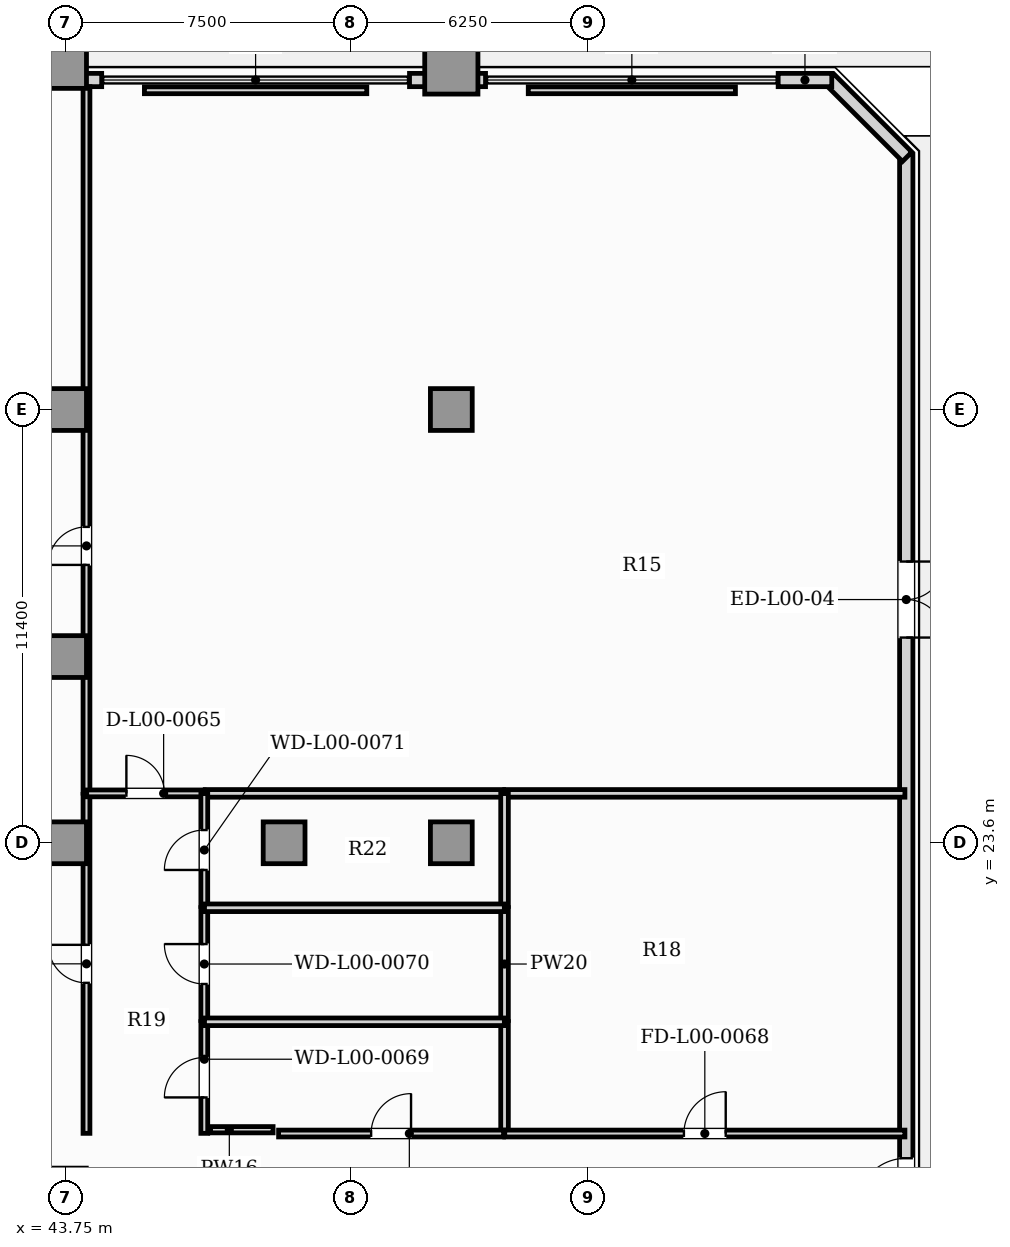
"""IFC4 building model, lengths in metres.
Left out: names, types, materials, properties, quantities, classifications, styles, units other than length and angle.
Written with IfcOpenShell. Run it as: python <this file> out.ifc"""

import sys

from ifc_helpers import new_model, si_unit, direction, frame, frame_2d, origin, origin_2d, place, context, subcontext, project, spatial, rectangle, hollow_rectangle, extrude, element, fill, save


model = new_model("IFC4")
c1 = context("Model", 3, precision=1e-05, world=origin(), true_north=direction((0.0, 1.0)))
c2 = subcontext(c1, "Body", "Model", "MODEL_VIEW")
j1 = project(units=[si_unit("LENGTHUNIT", "METRE"), si_unit("PLANEANGLEUNIT", "RADIAN")], contexts=[c1])
p1 = place(None, origin())
s1 = spatial("IfcSite", under=j1, at=p1, CompositionType="ELEMENT")
p2 = place(p1, origin())
s2 = spatial("IfcBuilding", under=s1, at=p2, CompositionType="ELEMENT")
p3 = place(p2, origin())
s3 = spatial("IfcBuildingStorey", under=s2, at=p3, CompositionType="ELEMENT", Elevation=0.0)
p4 = place(p3, frame((53.9, 44.0, 0.0), z_axis=(0.0, 0.0, 1.0), x_axis=(1.0, 0.0, 0.0)))
e1 = element("IfcColumn", 1, at=p4, inside=s3, PredefinedType="USERDEFINED", context=c2, shape_type="SweptSolid", body=[
    extrude(hollow_rectangle(XDim=1.4, YDim=1.4, WallThickness=0.08, at=origin_2d()), origin(), (0.0, 0.0, 1.0), 5.4),
])
for number, where, z_axis, x_axis in (
    (2, (43.75, 23.6, 0.0), (0.0, 0.0, 1.0), (1.0, 0.0, 0.0)),
    (3, (43.75, 35.0, 0.0), (0.0, 0.0, 1.0), (1.0, 0.0, 0.0)),
    (4, (43.75, 44.0, 0.0), (0.0, 0.0, 1.0), (1.0, 0.0, 0.0)),
    (5, (53.9, 23.6, 0.0), (0.0, 0.0, 1.0), (1.0, 0.0, 0.0)),
    (6, (53.9, 35.0, 0.0), (0.0, 0.0, 1.0), (1.0, 0.0, 0.0)),
    (7, (49.5, 23.6, 0.0), (0.0, 0.0, 1.0), (1.0, 0.0, 0.0)),
    (8, (43.75, 28.5, 0.0), (0.0, 0.0, 1.0), (1.0, 0.0, 0.0)),
):
    element("IfcColumn", number, at=place(p3, frame(where, z_axis=z_axis, x_axis=x_axis)), inside=s3, PredefinedType="COLUMN", context=c2, shape_type="SweptSolid", body=[
        extrude(rectangle(XDim=1.1, YDim=1.1, at=origin_2d()), origin(), (0.0, 0.0, 1.0), 5.4),
    ])
p5 = place(p3, frame((65.87, -0.66, 0.0), z_axis=(0.0, 0.0, 1.0), x_axis=(0.0, 1.0, 0.0)))
e9 = element("IfcWall", 9, at=p5, inside=s3, PredefinedType="SOLIDWALL", context=c2, shape_type="SweptSolid", body=[
    extrude(rectangle(XDim=42.37, YDim=0.35, at=frame_2d((21.185, 0.0))), origin(), (0.0, 0.0, 1.0), 4.2),
])
p6 = place(p5, frame((14.66, 0.0, 0.0)))
e10 = element("IfcOpeningElement", 10, at=p6, cuts=e9, PredefinedType="OPENING", context=c2, shape_type="SweptSolid", body=[
    extrude(rectangle(XDim=1.3, YDim=2.2, at=frame_2d((0.65, 1.1))), frame((0.0, 0.185, 0.0), z_axis=(0.0, -1.0, 0.0), x_axis=(1.0, 0.0, 0.0)), (0.0, 0.0, 1.0), 0.37),
])
p7 = place(p5, frame((29.66, 0.0, 0.0)))
e11 = element("IfcOpeningElement", 11, at=p7, cuts=e9, PredefinedType="OPENING", context=c2, shape_type="SweptSolid", body=[
    extrude(rectangle(XDim=2.0, YDim=2.4, at=frame_2d((1.0, 1.2))), frame((0.0, 0.185, 0.0), z_axis=(0.0, -1.0, 0.0), x_axis=(1.0, 0.0, 0.0)), (0.0, 0.0, 1.0), 0.37),
])
p8 = place(p3, frame((65.894, 41.651, 0.0), z_axis=(0.0, 0.0, 1.0), x_axis=(-0.707064536853, 0.707149022997, 0.0)))
e12 = element("IfcWall", 12, at=p8, inside=s3, PredefinedType="SOLIDWALL", context=c2, shape_type="SweptSolid", body=[
    extrude(rectangle(XDim=2.89, YDim=0.35, at=frame_2d((1.445, 0.0))), origin(), (0.0, 0.0, 1.0), 5.1),
])
p9 = place(p3, frame((42.8, 43.67, 0.0), z_axis=(0.0, 0.0, 1.0), x_axis=(1.0, 0.0, 0.0)))
e13 = element("IfcWall", 13, at=p9, inside=s3, PredefinedType="SOLIDWALL", context=c2, shape_type="SweptSolid", body=[
    extrude(rectangle(XDim=1.9, YDim=0.35, at=frame_2d((0.95, 0.0))), origin(), (0.0, 0.0, 1.0), 4.483),
])
p10 = place(p3, frame((52.8, 43.67, 0.0), z_axis=(0.0, 0.0, 1.0), x_axis=(1.0, 0.0, 0.0)))
e14 = element("IfcWall", 14, at=p10, inside=s3, PredefinedType="SOLIDWALL", context=c2, shape_type="SweptSolid", body=[
    extrude(rectangle(XDim=2.0, YDim=0.35, at=frame_2d((1.0, 0.0))), origin(), (0.0, 0.0, 1.0), 4.483),
])
p11 = place(p3, frame((62.5, 43.67, 0.0), z_axis=(0.0, 0.0, 1.0), x_axis=(1.0, 0.0, 0.0)))
e15 = element("IfcWall", 15, at=p11, inside=s3, PredefinedType="SOLIDWALL", context=c2, shape_type="SweptSolid", body=[
    extrude(rectangle(XDim=1.41, YDim=0.35, at=frame_2d((0.705, 0.0))), origin(), (0.0, 0.0, 1.0), 4.2),
])
p12 = place(p3, frame((44.3, 24.905, 0.0), z_axis=(0.0, 0.0, 1.0), x_axis=(0.0, 1.0, 0.0)))
e16 = element("IfcWall", 16, at=p12, inside=s3, PredefinedType="PARTITIONING", context=c2, shape_type="SweptSolid", body=[
    extrude(rectangle(XDim=18.59, YDim=0.18, at=frame_2d((9.295, 0.0))), origin(), (0.0, 0.0, 1.0), 5.1),
])
p13 = place(p12, frame((6.007, 0.0, 0.0)))
e17 = element("IfcOpeningElement", 17, at=p13, cuts=e16, PredefinedType="OPENING", context=c2, shape_type="SweptSolid", body=[
    extrude(rectangle(XDim=1.0, YDim=2.15, at=frame_2d((0.5, 1.075))), frame((0.0, 0.1, 0.0), z_axis=(0.0, -1.0, 0.0), x_axis=(1.0, 0.0, 0.0)), (0.0, 0.0, 1.0), 0.2),
])
p14 = place(p3, frame((44.3, 15.955, 0.0), z_axis=(0.0, 0.0, 1.0), x_axis=(0.0, 1.0, 0.0)))
e18 = element("IfcWall", 18, at=p14, inside=s3, PredefinedType="PARTITIONING", context=c2, shape_type="SweptSolid", body=[
    extrude(rectangle(XDim=8.92, YDim=0.18, at=frame_2d((4.46, 0.0))), origin(), (0.0, 0.0, 1.0), 5.1),
])
p15 = place(p14, frame((3.96, 0.0, 0.0)))
e19 = element("IfcOpeningElement", 19, at=p15, cuts=e18, PredefinedType="OPENING", context=c2, shape_type="SweptSolid", body=[
    extrude(rectangle(XDim=1.0, YDim=2.15, at=frame_2d((0.5, 1.075))), frame((0.0, 0.1, 0.0), z_axis=(0.0, -1.0, 0.0), x_axis=(1.0, 0.0, 0.0)), (0.0, 0.0, 1.0), 0.2),
])
p16 = place(p3, frame((55.305, 24.9, 0.0), z_axis=(0.0, 0.0, 1.0), x_axis=(1.0, 0.0, 0.0)))
e20 = element("IfcWall", 20, at=p16, inside=s3, PredefinedType="PARTITIONING", context=c2, shape_type="SweptSolid", body=[
    extrude(rectangle(XDim=10.53, YDim=0.2, at=frame_2d((5.265, 0.0))), origin(), (0.0, 0.0, 1.0), 5.1),
])
p17 = place(p3, frame((44.305, 24.9, 0.0), z_axis=(0.0, 0.0, 1.0), x_axis=(1.0, 0.0, 0.0)))
e21 = element("IfcWall", 21, at=p17, inside=s3, PredefinedType="PARTITIONING", context=c2, shape_type="SweptSolid", body=[
    extrude(rectangle(XDim=3.09, YDim=0.18, at=frame_2d((1.545, 0.0))), origin(), (0.0, 0.0, 1.0), 5.1),
])
p18 = place(p17, frame((1.045, 0.0, 0.0)))
e22 = element("IfcOpeningElement", 22, at=p18, cuts=e21, PredefinedType="OPENING", context=c2, shape_type="SweptSolid", body=[
    extrude(rectangle(XDim=1.0, YDim=2.15, at=frame_2d((0.5, 1.075))), frame((0.0, 0.1, 0.0), z_axis=(0.0, -1.0, 0.0), x_axis=(1.0, 0.0, 0.0)), (0.0, 0.0, 1.0), 0.2),
])
p19 = place(p3, frame((47.425, 24.9, 0.0), z_axis=(0.0, 0.0, 1.0), x_axis=(1.0, 0.0, 0.0)))
e23 = element("IfcWall", 23, at=p19, inside=s3, PredefinedType="PARTITIONING", context=c2, shape_type="SweptSolid", body=[
    extrude(rectangle(XDim=7.85, YDim=0.2, at=frame_2d((3.925, 0.0))), origin(), (0.0, 0.0, 1.0), 5.1),
])
p20 = place(p3, frame((55.3, 15.955, 0.0), z_axis=(0.0, 0.0, 1.0), x_axis=(0.0, 1.0, 0.0)))
e24 = element("IfcWall", 24, at=p20, inside=s3, PredefinedType="PARTITIONING", context=c2, shape_type="SweptSolid", body=[
    extrude(rectangle(XDim=2.94, YDim=0.2, at=frame_2d((1.47, 0.0))), origin(), (0.0, 0.0, 1.0), 5.1),
])
for number, where, z_axis, x_axis in (
    (25, (55.3, 18.925, 0.0), (0.0, 0.0, 1.0), (0.0, 1.0, 0.0)),
    (26, (55.3, 21.925, 0.0), (0.0, 0.0, 1.0), (0.0, 1.0, 0.0)),
):
    element("IfcWall", number, at=place(p3, frame(where, z_axis=z_axis, x_axis=x_axis)), inside=s3, PredefinedType="PARTITIONING", context=c2, shape_type="SweptSolid", body=[
        extrude(rectangle(XDim=2.97, YDim=0.2, at=frame_2d((1.485, 0.0))), origin(), (0.0, 0.0, 1.0), 5.1),
    ])
p21 = place(p3, frame((55.305, 15.95, 0.0), z_axis=(0.0, 0.0, 1.0), x_axis=(1.0, 0.0, 0.0)))
e27 = element("IfcWall", 27, at=p21, inside=s3, PredefinedType="PARTITIONING", context=c2, shape_type="SweptSolid", body=[
    extrude(rectangle(XDim=10.53, YDim=0.18, at=frame_2d((5.265, 0.0))), origin(), (0.0, 0.0, 1.0), 5.1),
])
p22 = place(p21, frame((4.715, 0.0, 0.0)))
e28 = element("IfcOpeningElement", 28, at=p22, cuts=e27, PredefinedType="OPENING", context=c2, shape_type="SweptSolid", body=[
    extrude(rectangle(XDim=1.1, YDim=2.2, at=frame_2d((0.55, 1.1))), frame((0.0, 0.1, 0.0), z_axis=(0.0, -1.0, 0.0), x_axis=(1.0, 0.0, 0.0)), (0.0, 0.0, 1.0), 0.2),
])
p23 = place(p3, frame((47.4, 15.955, 0.0), z_axis=(0.0, 0.0, 1.0), x_axis=(0.0, 1.0, 0.0)))
e29 = element("IfcWall", 29, at=p23, inside=s3, PredefinedType="PARTITIONING", context=c2, shape_type="SweptSolid", body=[
    extrude(rectangle(XDim=2.94, YDim=0.18, at=frame_2d((1.47, 0.0))), origin(), (0.0, 0.0, 1.0), 5.1),
])
p24 = place(p23, frame((0.945, 0.0, 0.0)))
e30 = element("IfcOpeningElement", 30, at=p24, cuts=e29, PredefinedType="OPENING", context=c2, shape_type="SweptSolid", body=[
    extrude(rectangle(XDim=1.05, YDim=2.15, at=frame_2d((0.525, 1.075))), frame((0.0, 0.1, 0.0), z_axis=(0.0, -1.0, 0.0), x_axis=(1.0, 0.0, 0.0)), (0.0, 0.0, 1.0), 0.2),
])
p25 = place(p3, frame((47.4, 18.925, 0.0), z_axis=(0.0, 0.0, 1.0), x_axis=(0.0, 1.0, 0.0)))
e31 = element("IfcWall", 31, at=p25, inside=s3, PredefinedType="PARTITIONING", context=c2, shape_type="SweptSolid", body=[
    extrude(rectangle(XDim=2.97, YDim=0.18, at=frame_2d((1.485, 0.0))), origin(), (0.0, 0.0, 1.0), 5.1),
])
p26 = place(p25, frame((0.96, 0.0, 0.0)))
e32 = element("IfcOpeningElement", 32, at=p26, cuts=e31, PredefinedType="OPENING", context=c2, shape_type="SweptSolid", body=[
    extrude(rectangle(XDim=1.05, YDim=2.15, at=frame_2d((0.525, 1.075))), frame((0.0, 0.1, 0.0), z_axis=(0.0, -1.0, 0.0), x_axis=(1.0, 0.0, 0.0)), (0.0, 0.0, 1.0), 0.2),
])
p27 = place(p3, frame((47.4, 21.925, 0.0), z_axis=(0.0, 0.0, 1.0), x_axis=(0.0, 1.0, 0.0)))
e33 = element("IfcWall", 33, at=p27, inside=s3, PredefinedType="PARTITIONING", context=c2, shape_type="SweptSolid", body=[
    extrude(rectangle(XDim=2.97, YDim=0.18, at=frame_2d((1.485, 0.0))), origin(), (0.0, 0.0, 1.0), 5.1),
])
p28 = place(p27, frame((0.96, 0.0, 0.0)))
e34 = element("IfcOpeningElement", 34, at=p28, cuts=e33, PredefinedType="OPENING", context=c2, shape_type="SweptSolid", body=[
    extrude(rectangle(XDim=1.05, YDim=2.15, at=frame_2d((0.525, 1.075))), frame((0.0, 0.1, 0.0), z_axis=(0.0, -1.0, 0.0), x_axis=(1.0, 0.0, 0.0)), (0.0, 0.0, 1.0), 0.2),
])
p29 = place(p3, frame((47.405, 18.89, 0.0), z_axis=(0.0, 0.0, 1.0), x_axis=(1.0, 0.0, 0.0)))
e35 = element("IfcWall", 35, at=p29, inside=s3, PredefinedType="PARTITIONING", context=c2, shape_type="SweptSolid", body=[
    extrude(rectangle(XDim=7.89, YDim=0.2, at=frame_2d((3.945, 0.0))), origin(), (0.0, 0.0, 1.0), 5.1),
])
p30 = place(p3, frame((49.355, 15.95, 0.0), z_axis=(0.0, 0.0, 1.0), x_axis=(1.0, 0.0, 0.0)))
e36 = element("IfcWall", 36, at=p30, inside=s3, PredefinedType="PARTITIONING", context=c2, shape_type="SweptSolid", body=[
    extrude(rectangle(XDim=5.92, YDim=0.18, at=frame_2d((2.96, 0.0))), origin(), (0.0, 0.0, 1.0), 5.1),
])
p31 = place(p30, frame((2.435, 0.0, 0.0)))
e37 = element("IfcOpeningElement", 37, at=p31, cuts=e36, PredefinedType="OPENING", context=c2, shape_type="SweptSolid", body=[
    extrude(rectangle(XDim=1.05, YDim=2.15, at=frame_2d((0.525, 1.075))), frame((0.0, 0.1, 0.0), z_axis=(0.0, -1.0, 0.0), x_axis=(1.0, 0.0, 0.0)), (0.0, 0.0, 1.0), 0.2),
])
p32 = place(p3, frame((47.405, 21.89, 0.0), z_axis=(0.0, 0.0, 1.0), x_axis=(1.0, 0.0, 0.0)))
e38 = element("IfcWall", 38, at=p32, inside=s3, PredefinedType="PARTITIONING", context=c2, shape_type="SweptSolid", body=[
    extrude(rectangle(XDim=7.89, YDim=0.2, at=frame_2d((3.945, 0.0))), origin(), (0.0, 0.0, 1.0), 5.1),
])
p33 = place(p3, frame((61.375, 43.4, 0.0), z_axis=(0.0, 0.0, 1.0), x_axis=(-1.0, 0.0, 0.0)))
e39 = element("IfcWall", 39, at=p33, inside=s3, PredefinedType="PARTITIONING", context=c2, shape_type="SweptSolid", body=[
    extrude(rectangle(XDim=5.451, YDim=0.18, at=frame_2d((2.726, 0.0))), origin(), (0.0, 0.0, 1.0), 5.1),
])
p34 = place(p3, frame((51.676, 43.4, 0.0), z_axis=(0.0, 0.0, 1.0), x_axis=(-1.0, 0.0, 0.0)))
e40 = element("IfcWall", 40, at=p34, inside=s3, PredefinedType="PARTITIONING", context=c2, shape_type="SweptSolid", body=[
    extrude(rectangle(XDim=5.851, YDim=0.18, at=frame_2d((2.926, 0.0))), origin(), (0.0, 0.0, 1.0), 5.1),
])
p35 = place(p3, frame((47.565, 16.05, 0.0), z_axis=(0.0, 0.0, 1.0), x_axis=(1.0, 0.0, 0.0)))
e41 = element("IfcWall", 41, at=p35, inside=s3, PredefinedType="PLUMBINGWALL", context=c2, shape_type="SweptSolid", body=[
    extrude(rectangle(XDim=1.645, YDim=0.165, at=frame_2d((0.823, 0.0))), origin(), (0.0, 0.0, 1.0), 5.1),
])
p36 = place(p6, frame((1.3, 0.0, 0.0), z_axis=(0.0, 0.0, 1.0), x_axis=(-1.0, 0.0, 0.0)))
e42 = element("IfcDoor", 42, at=p36, inside=s3, OperationType="SINGLE_SWING_RIGHT", PredefinedType="DOOR", context=c2, shape_type="SweptSolid", body=[
    extrude(rectangle(XDim=1.3, YDim=2.2, at=frame_2d((0.65, 1.1))), frame((0.0, 0.025, 0.0), z_axis=(0.0, -1.0, 0.0), x_axis=(1.0, 0.0, 0.0)), (0.0, 0.0, 1.0), 0.05),
])
fill(e10, e42)
p37 = place(p7, frame((2.0, 0.0, 0.0), z_axis=(0.0, 0.0, 1.0), x_axis=(-1.0, 0.0, 0.0)))
e43 = element("IfcDoor", 43, at=p37, inside=s3, OperationType="DOUBLE_DOOR_SINGLE_SWING", PredefinedType="DOOR", context=c2, shape_type="SweptSolid", body=[
    extrude(rectangle(XDim=2.0, YDim=2.4, at=frame_2d((1.0, 1.2))), frame((0.0, 0.025, 0.0), z_axis=(0.0, -1.0, 0.0), x_axis=(1.0, 0.0, 0.0)), (0.0, 0.0, 1.0), 0.05),
])
fill(e11, e43)
p38 = place(p13, origin())
e44 = element("IfcDoor", 44, at=p38, inside=s3, OperationType="SINGLE_SWING_LEFT", PredefinedType="DOOR", context=c2, shape_type="SweptSolid", body=[
    extrude(rectangle(XDim=1.0, YDim=2.15, at=frame_2d((0.5, 1.075))), frame((0.0, 0.025, 0.0), z_axis=(0.0, -1.0, 0.0), x_axis=(1.0, 0.0, 0.0)), (0.0, 0.0, 1.0), 0.05),
])
fill(e17, e44)
p39 = place(p15, origin())
e45 = element("IfcDoor", 45, at=p39, inside=s3, OperationType="SINGLE_SWING_RIGHT", PredefinedType="DOOR", context=c2, shape_type="SweptSolid", body=[
    extrude(rectangle(XDim=1.0, YDim=2.15, at=frame_2d((0.5, 1.075))), frame((0.0, 0.025, 0.0), z_axis=(0.0, -1.0, 0.0), x_axis=(1.0, 0.0, 0.0)), (0.0, 0.0, 1.0), 0.05),
])
fill(e19, e45)
p40 = place(p18, origin())
e46 = element("IfcDoor", 46, at=p40, inside=s3, OperationType="SINGLE_SWING_LEFT", PredefinedType="DOOR", context=c2, shape_type="SweptSolid", body=[
    extrude(rectangle(XDim=1.0, YDim=2.15, at=frame_2d((0.5, 1.075))), frame((0.0, 0.025, 0.0), z_axis=(0.0, -1.0, 0.0), x_axis=(1.0, 0.0, 0.0)), (0.0, 0.0, 1.0), 0.05),
])
fill(e22, e46)
p41 = place(p22, origin())
e47 = element("IfcDoor", 47, at=p41, inside=s3, OperationType="SINGLE_SWING_RIGHT", PredefinedType="DOOR", context=c2, shape_type="SweptSolid", body=[
    extrude(rectangle(XDim=1.1, YDim=2.2, at=frame_2d((0.55, 1.1))), frame((0.0, 0.025, 0.0), z_axis=(0.0, -1.0, 0.0), x_axis=(1.0, 0.0, 0.0)), (0.0, 0.0, 1.0), 0.05),
])
fill(e28, e47)
p42 = place(p24, origin())
e48 = element("IfcDoor", 48, at=p42, inside=s3, OperationType="SINGLE_SWING_LEFT", PredefinedType="DOOR", context=c2, shape_type="SweptSolid", body=[
    extrude(rectangle(XDim=1.05, YDim=2.15, at=frame_2d((0.525, 1.075))), frame((0.0, 0.025, 0.0), z_axis=(0.0, -1.0, 0.0), x_axis=(1.0, 0.0, 0.0)), (0.0, 0.0, 1.0), 0.05),
])
fill(e30, e48)
p43 = place(p26, origin())
e49 = element("IfcDoor", 49, at=p43, inside=s3, OperationType="SINGLE_SWING_RIGHT", PredefinedType="DOOR", context=c2, shape_type="SweptSolid", body=[
    extrude(rectangle(XDim=1.05, YDim=2.15, at=frame_2d((0.525, 1.075))), frame((0.0, 0.025, 0.0), z_axis=(0.0, -1.0, 0.0), x_axis=(1.0, 0.0, 0.0)), (0.0, 0.0, 1.0), 0.05),
])
fill(e32, e49)
p44 = place(p28, origin())
e50 = element("IfcDoor", 50, at=p44, inside=s3, OperationType="SINGLE_SWING_LEFT", PredefinedType="DOOR", context=c2, shape_type="SweptSolid", body=[
    extrude(rectangle(XDim=1.05, YDim=2.15, at=frame_2d((0.525, 1.075))), frame((0.0, 0.025, 0.0), z_axis=(0.0, -1.0, 0.0), x_axis=(1.0, 0.0, 0.0)), (0.0, 0.0, 1.0), 0.05),
])
fill(e34, e50)
p45 = place(p31, origin())
e51 = element("IfcDoor", 51, at=p45, inside=s3, OperationType="SINGLE_SWING_RIGHT", PredefinedType="DOOR", context=c2, shape_type="SweptSolid", body=[
    extrude(rectangle(XDim=1.05, YDim=2.15, at=frame_2d((0.525, 1.075))), frame((0.0, 0.025, 0.0), z_axis=(0.0, -1.0, 0.0), x_axis=(1.0, 0.0, 0.0)), (0.0, 0.0, 1.0), 0.05),
])
fill(e37, e51)
save(model, sys.argv[1])
